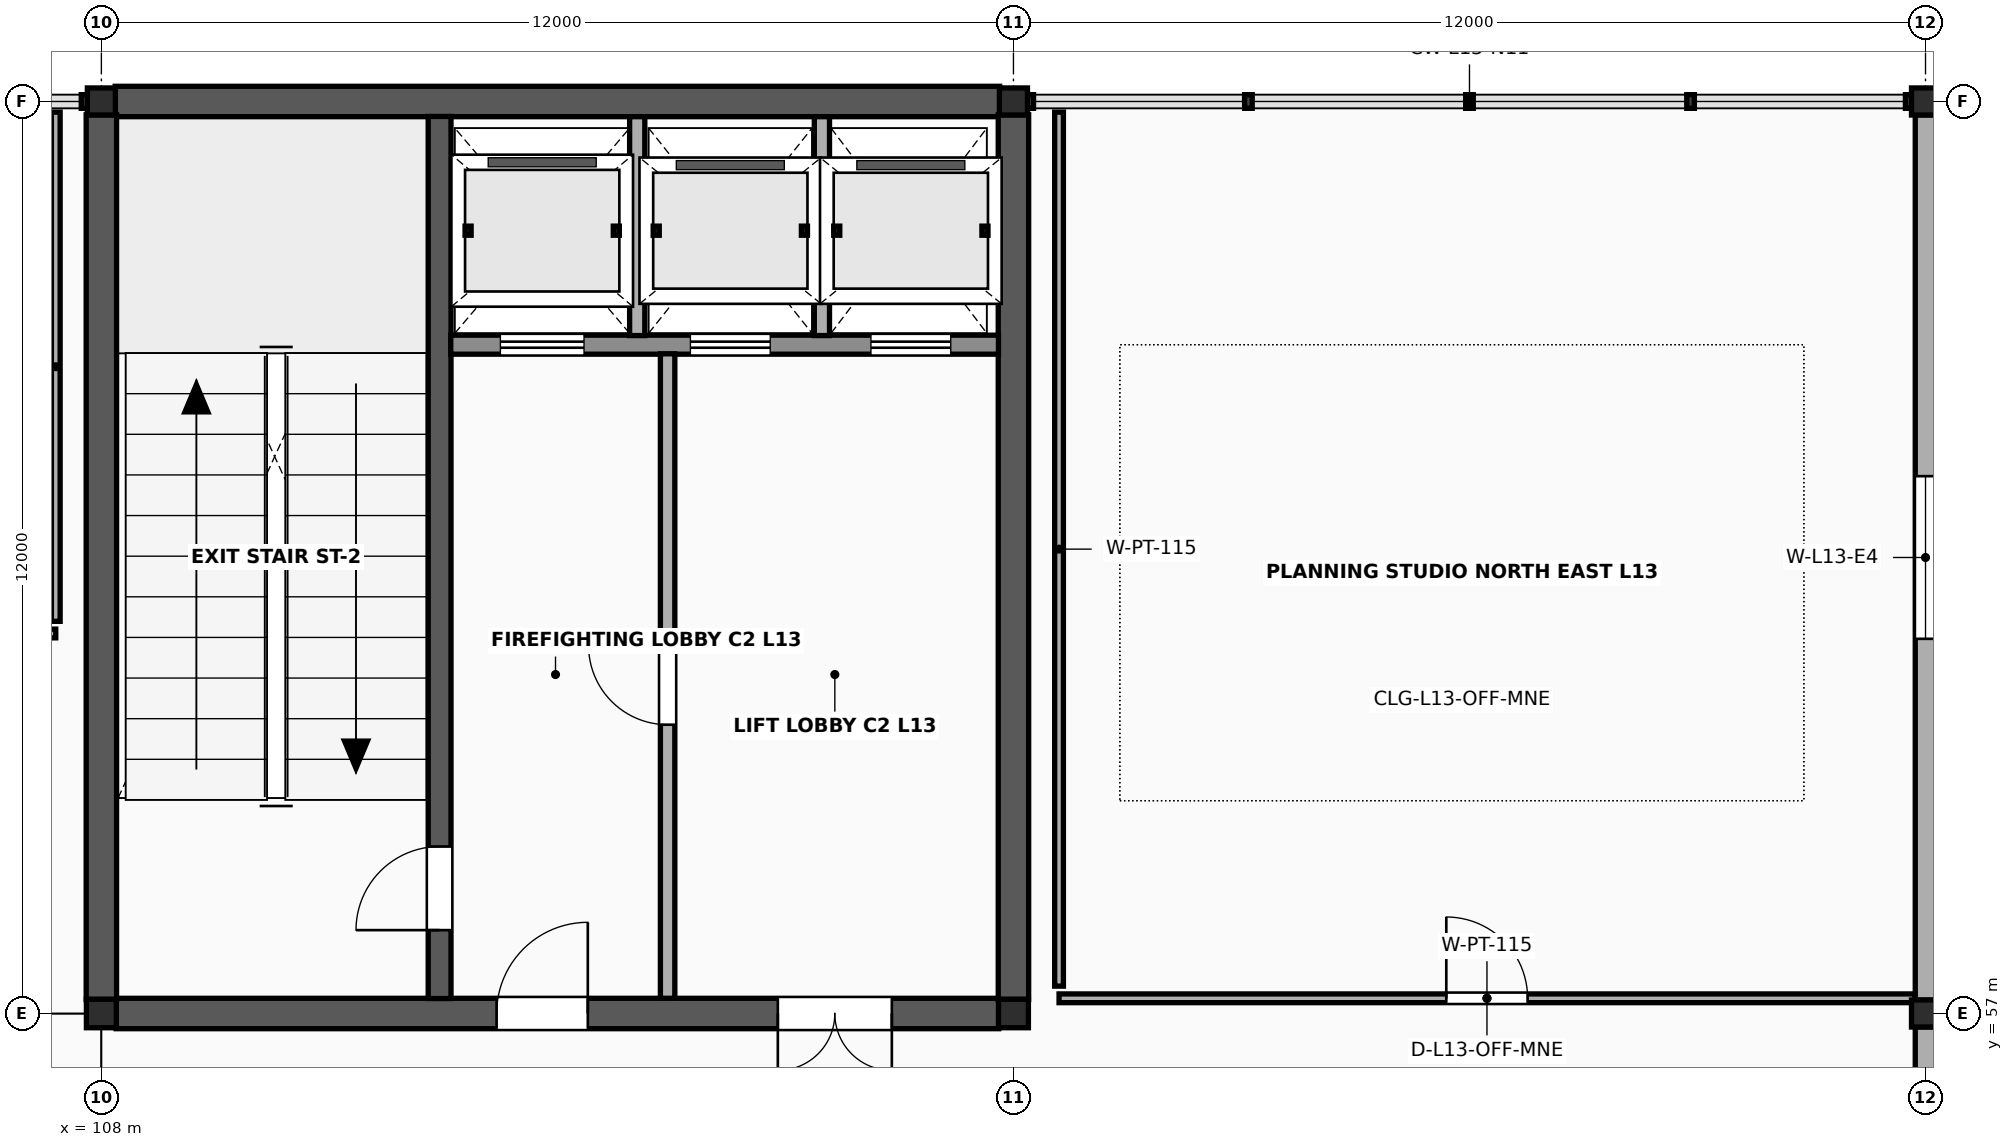
"""IFC4 building model, lengths in metres.
Left out: names, types, materials, properties, quantities, classifications, styles, units other than length and angle.
Written with IfcOpenShell. Run it as: python <this file> out.ifc"""

import sys

from ifc_helpers import new_model, si_unit, direction, frame, frame_2d, origin, origin_2d, place, context, subcontext, project, spatial, rectangle, i_section, extrude, element, fill, save


model = new_model("IFC4")
c1 = context("Model", 3, precision=1e-05, world=origin(), true_north=direction((0.0, 1.0)))
c2 = subcontext(c1, "Body", "Model", "MODEL_VIEW")
j1 = project(units=[si_unit("LENGTHUNIT", "METRE"), si_unit("PLANEANGLEUNIT", "RADIAN")], contexts=[c1])
p1 = place(None, origin())
s1 = spatial("IfcSite", under=j1, at=p1, CompositionType="ELEMENT")
p2 = place(p1, origin())
s2 = spatial("IfcBuilding", under=s1, at=p2, CompositionType="ELEMENT")
p3 = place(p2, frame((0.0, 0.0, 53.6)))
s3 = spatial("IfcBuildingStorey", under=s2, at=p3, CompositionType="ELEMENT", Elevation=53.6)
p4 = place(p3, frame((108.0, 57.0, 0.0), z_axis=(0.0, 0.0, 1.0), x_axis=(1.0, 0.0, 0.0)))
e1 = element("IfcColumn", 1, at=p4, inside=s3, PredefinedType="COLUMN", context=c2, shape_type="SweptSolid", body=[
    extrude(i_section(OverallWidth=0.394, OverallDepth=0.375, WebThickness=0.017, FlangeThickness=0.028, FilletRadius=0.018, at=origin_2d()), origin(), (0.0, 0.0, 1.0), 4.0),
])
p5 = place(p3, frame((108.0, 69.0, 0.0), z_axis=(0.0, 0.0, 1.0), x_axis=(1.0, 0.0, 0.0)))
e2 = element("IfcColumn", 2, at=p5, inside=s3, PredefinedType="COLUMN", context=c2, shape_type="SweptSolid", body=[
    extrude(i_section(OverallWidth=0.369, OverallDepth=0.356, WebThickness=0.011, FlangeThickness=0.018, FilletRadius=0.018, at=origin_2d()), origin(), (0.0, 0.0, 1.0), 4.0),
])
p6 = place(p3, frame((120.0, 57.0, 0.0), z_axis=(0.0, 0.0, 1.0), x_axis=(1.0, 0.0, 0.0)))
e3 = element("IfcColumn", 3, at=p6, inside=s3, PredefinedType="COLUMN", context=c2, shape_type="SweptSolid", body=[
    extrude(i_section(OverallWidth=0.394, OverallDepth=0.375, WebThickness=0.017, FlangeThickness=0.028, FilletRadius=0.018, at=origin_2d()), origin(), (0.0, 0.0, 1.0), 4.0),
])
for number, where, z_axis, x_axis in (
    (4, (120.0, 69.0, 0.0), (0.0, 0.0, 1.0), (1.0, 0.0, 0.0)),
    (5, (132.0, 57.0, 0.0), (0.0, 0.0, 1.0), (1.0, 0.0, 0.0)),
    (6, (132.0, 69.0, 0.0), (0.0, 0.0, 1.0), (1.0, 0.0, 0.0)),
):
    element("IfcColumn", number, at=place(p3, frame(where, z_axis=z_axis, x_axis=x_axis)), inside=s3, PredefinedType="COLUMN", context=c2, shape_type="SweptSolid", body=[
        extrude(i_section(OverallWidth=0.369, OverallDepth=0.356, WebThickness=0.011, FlangeThickness=0.018, FilletRadius=0.018, at=origin_2d()), origin(), (0.0, 0.0, 1.0), 4.0),
    ])
p7 = place(p3, frame((108.194, 57.0, 0.0), z_axis=(0.0, 0.0, 1.0), x_axis=(1.0, 0.0, 0.0)))
e7 = element("IfcWall", 7, at=p7, inside=s3, PredefinedType="SHEAR", context=c2, shape_type="SweptSolid", body=[
    extrude(rectangle(XDim=11.612, YDim=0.4, at=frame_2d((5.806, 0.0))), origin(), (0.0, 0.0, 1.0), 3.818),
])
p8 = place(p7, frame((5.006, 0.0, 0.0)))
e8 = element("IfcOpeningElement", 8, at=p8, cuts=e7, PredefinedType="OPENING", context=c2, shape_type="SweptSolid", body=[
    extrude(rectangle(XDim=1.2, YDim=2.2, at=frame_2d((0.6, 1.1))), frame((0.0, 0.215, 0.0), z_axis=(0.0, -1.0, 0.0), x_axis=(1.0, 0.0, 0.0)), (0.0, 0.0, 1.0), 0.43),
])
p9 = place(p7, frame((8.706, 0.0, 0.0)))
e9 = element("IfcOpeningElement", 9, at=p9, cuts=e7, PredefinedType="OPENING", context=c2, shape_type="SweptSolid", body=[
    extrude(rectangle(XDim=1.5, YDim=2.25, at=frame_2d((0.75, 1.125))), frame((0.0, 0.215, 0.0), z_axis=(0.0, -1.0, 0.0), x_axis=(1.0, 0.0, 0.0)), (0.0, 0.0, 1.0), 0.43),
])
p10 = place(p3, frame((108.181, 69.0, 0.0), z_axis=(0.0, 0.0, 1.0), x_axis=(1.0, 0.0, 0.0)))
e10 = element("IfcWall", 10, at=p10, inside=s3, PredefinedType="SHEAR", context=c2, shape_type="SweptSolid", body=[
    extrude(rectangle(XDim=11.637, YDim=0.4, at=frame_2d((5.819, 0.0))), origin(), (0.0, 0.0, 1.0), 3.818),
])
for number, where, z_axis, x_axis in (
    (11, (108.0, 57.185, 0.0), (0.0, 0.0, 1.0), (0.0, 1.0, 0.0)),
    (12, (120.0, 57.185, 0.0), (0.0, 0.0, 1.0), (0.0, 1.0, 0.0)),
):
    element("IfcWall", number, at=place(p3, frame(where, z_axis=z_axis, x_axis=x_axis)), inside=s3, PredefinedType="SHEAR", context=c2, shape_type="SweptSolid", body=[
        extrude(rectangle(XDim=11.64, YDim=0.4, at=frame_2d((5.82, 0.0))), origin(), (0.0, 0.0, 1.0), 3.818),
    ])
p11 = place(p3, frame((112.45, 57.197, 0.0), z_axis=(0.0, 0.0, 1.0), x_axis=(0.0, 1.0, 0.0)))
e13 = element("IfcWall", 13, at=p11, inside=s3, PredefinedType="SHEAR", context=c2, shape_type="SweptSolid", body=[
    extrude(rectangle(XDim=11.606, YDim=0.3, at=frame_2d((5.803, 0.0))), origin(), (0.0, 0.0, 1.0), 3.818),
])
p12 = place(p11, frame((0.9, 0.0, 0.0)))
e14 = element("IfcOpeningElement", 14, at=p12, cuts=e13, PredefinedType="OPENING", context=c2, shape_type="SweptSolid", body=[
    extrude(rectangle(XDim=1.1, YDim=2.2, at=frame_2d((0.55, 1.1))), frame((0.0, 0.165, 0.0), z_axis=(0.0, -1.0, 0.0), x_axis=(1.0, 0.0, 0.0)), (0.0, 0.0, 1.0), 0.33),
])
p13 = place(p3, frame((112.597, 65.8, 0.0), z_axis=(0.0, 0.0, 1.0), x_axis=(1.0, 0.0, 0.0)))
e15 = element("IfcWall", 15, at=p13, inside=s3, PredefinedType="SOLIDWALL", context=c2, shape_type="SweptSolid", body=[
    extrude(rectangle(XDim=7.206, YDim=0.25, at=frame_2d((3.603, 0.0))), origin(), (0.0, 0.0, 1.0), 3.818),
])
p14 = place(p13, frame((0.653, 0.0, 0.0)))
e16 = element("IfcOpeningElement", 16, at=p14, cuts=e15, PredefinedType="OPENING", context=c2, shape_type="SweptSolid", body=[
    extrude(rectangle(XDim=1.1, YDim=2.24, at=frame_2d((0.55, 1.12))), frame((0.0, 0.14, 0.0), z_axis=(0.0, -1.0, 0.0), x_axis=(1.0, 0.0, 0.0)), (0.0, 0.0, 1.0), 0.28),
])
p15 = place(p13, frame((3.153, 0.0, 0.0)))
e17 = element("IfcOpeningElement", 17, at=p15, cuts=e15, PredefinedType="OPENING", context=c2, shape_type="SweptSolid", body=[
    extrude(rectangle(XDim=1.05, YDim=2.2, at=frame_2d((0.525, 1.1))), frame((0.0, 0.14, 0.0), z_axis=(0.0, -1.0, 0.0), x_axis=(1.0, 0.0, 0.0)), (0.0, 0.0, 1.0), 0.28),
])
p16 = place(p13, frame((5.528, 0.0, 0.0)))
e18 = element("IfcOpeningElement", 18, at=p16, cuts=e15, PredefinedType="OPENING", context=c2, shape_type="SweptSolid", body=[
    extrude(rectangle(XDim=1.05, YDim=2.2, at=frame_2d((0.525, 1.1))), frame((0.0, 0.14, 0.0), z_axis=(0.0, -1.0, 0.0), x_axis=(1.0, 0.0, 0.0)), (0.0, 0.0, 1.0), 0.28),
])
for number, where, z_axis, x_axis in (
    (19, (115.05, 65.92, 0.0), (0.0, 0.0, 1.0), (0.0, 1.0, 0.0)),
    (20, (117.48, 65.92, 0.0), (0.0, 0.0, 1.0), (0.0, 1.0, 0.0)),
):
    element("IfcWall", number, at=place(p3, frame(where, z_axis=z_axis, x_axis=x_axis)), inside=s3, PredefinedType="SOLIDWALL", context=c2, shape_type="SweptSolid", body=[
        extrude(rectangle(XDim=2.88, YDim=0.2, at=frame_2d((1.44, 0.0))), origin(), (0.0, 0.0, 1.0), 3.808),
    ])
p17 = place(p3, frame((115.45, 57.2, 0.0), z_axis=(0.0, 0.0, 1.0), x_axis=(0.0, 1.0, 0.0)))
e21 = element("IfcWall", 21, at=p17, inside=s3, PredefinedType="SOLIDWALL", context=c2, shape_type="SweptSolid", body=[
    extrude(rectangle(XDim=8.48, YDim=0.19, at=frame_2d((4.24, 0.0))), origin(), (0.0, 0.0, 1.0), 3.808),
])
p18 = place(p17, frame((3.6, 0.0, 0.0)))
e22 = element("IfcOpeningElement", 22, at=p18, cuts=e21, PredefinedType="OPENING", context=c2, shape_type="SweptSolid", body=[
    extrude(rectangle(XDim=1.04, YDim=2.18, at=frame_2d((0.52, 1.09))), frame((0.0, 0.11, 0.0), z_axis=(0.0, -1.0, 0.0), x_axis=(1.0, 0.0, 0.0)), (0.0, 0.0, 1.0), 0.22),
])
p19 = place(p3, frame((132.0, 45.176, 0.0), z_axis=(0.0, 0.0, 1.0), x_axis=(0.0, 1.0, 0.0)))
e23 = element("IfcWall", 23, at=p19, inside=s3, PredefinedType="SOLIDWALL", context=c2, shape_type="SweptSolid", body=[
    extrude(rectangle(XDim=11.648, YDim=0.27, at=frame_2d((5.824, 0.0))), origin(), (0.0, 0.0, 1.0), 3.271),
])
p20 = place(p19, frame((4.834, 0.0, 0.78)))
e24 = element("IfcOpeningElement", 24, at=p20, cuts=e23, PredefinedType="OPENING", context=c2, shape_type="SweptSolid", body=[
    extrude(rectangle(XDim=1.98, YDim=1.58, at=frame_2d((0.99, 0.79))), frame((0.0, 0.15, 0.0), z_axis=(0.0, -1.0, 0.0), x_axis=(1.0, 0.0, 0.0)), (0.0, 0.0, 1.0), 0.3),
])
p21 = place(p3, frame((132.0, 57.176, 0.0), z_axis=(0.0, 0.0, 1.0), x_axis=(0.0, 1.0, 0.0)))
e25 = element("IfcWall", 25, at=p21, inside=s3, PredefinedType="SOLIDWALL", context=c2, shape_type="SweptSolid", body=[
    extrude(rectangle(XDim=11.648, YDim=0.27, at=frame_2d((5.824, 0.0))), origin(), (0.0, 0.0, 1.0), 3.271),
])
p22 = place(p21, frame((4.754, 0.0, 0.78)))
e26 = element("IfcOpeningElement", 26, at=p22, cuts=e25, PredefinedType="OPENING", context=c2, shape_type="SweptSolid", body=[
    extrude(rectangle(XDim=2.14, YDim=1.58, at=frame_2d((1.07, 0.79))), frame((0.0, 0.15, 0.0), z_axis=(0.0, -1.0, 0.0), x_axis=(1.0, 0.0, 0.0)), (0.0, 0.0, 1.0), 0.3),
])
p23 = place(p3, frame((73.0, 62.0, 0.0), z_axis=(0.0, 0.0, 1.0), x_axis=(1.0, 0.0, 0.0)))
e27 = element("IfcWall", 27, at=p23, inside=s3, PredefinedType="PARTITIONING", context=c2, shape_type="SweptSolid", body=[
    extrude(rectangle(XDim=34.4, YDim=0.115, at=frame_2d((17.2, 0.0))), origin(), (0.0, 0.0, 1.0), 2.88),
])
p24 = place(p23, frame((16.27, 0.0, 0.0)))
e28 = element("IfcOpeningElement", 28, at=p24, cuts=e27, PredefinedType="OPENING", context=c2, shape_type="SweptSolid", body=[
    extrude(rectangle(XDim=1.86, YDim=2.41, at=frame_2d((0.93, 1.205))), frame((0.0, 0.073, 0.0), z_axis=(0.0, -1.0, 0.0), x_axis=(1.0, 0.0, 0.0)), (0.0, 0.0, 1.0), 0.145),
])
p25 = place(p3, frame((107.4, 62.16, 0.0), z_axis=(0.0, 0.0, 1.0), x_axis=(0.0, 1.0, 0.0)))
e29 = element("IfcWall", 29, at=p25, inside=s3, PredefinedType="PARTITIONING", context=c2, shape_type="SweptSolid", body=[
    extrude(rectangle(XDim=6.7, YDim=0.115, at=frame_2d((3.35, 0.0))), origin(), (0.0, 0.0, 1.0), 2.88),
])
p26 = place(p3, frame((120.6, 57.2, 0.0), z_axis=(0.0, 0.0, 1.0), x_axis=(1.0, 0.0, 0.0)))
e30 = element("IfcWall", 30, at=p26, inside=s3, PredefinedType="PARTITIONING", context=c2, shape_type="SweptSolid", body=[
    extrude(rectangle(XDim=11.26, YDim=0.115, at=frame_2d((5.63, 0.0))), origin(), (0.0, 0.0, 1.0), 2.88),
])
p27 = place(p26, frame((5.095, 0.0, 0.0)))
e31 = element("IfcOpeningElement", 31, at=p27, cuts=e30, PredefinedType="OPENING", context=c2, shape_type="SweptSolid", body=[
    extrude(rectangle(XDim=1.07, YDim=2.19, at=frame_2d((0.535, 1.095))), frame((0.0, 0.073, 0.0), z_axis=(0.0, -1.0, 0.0), x_axis=(1.0, 0.0, 0.0)), (0.0, 0.0, 1.0), 0.145),
])
p28 = place(p3, frame((120.6, 57.36, 0.0), z_axis=(0.0, 0.0, 1.0), x_axis=(0.0, 1.0, 0.0)))
e32 = element("IfcWall", 32, at=p28, inside=s3, PredefinedType="PARTITIONING", context=c2, shape_type="SweptSolid", body=[
    extrude(rectangle(XDim=11.5, YDim=0.115, at=frame_2d((5.75, 0.0))), origin(), (0.0, 0.0, 1.0), 2.88),
])
p29 = place(p22, origin())
e33 = element("IfcWindow", 33, at=p29, inside=s3, PartitioningType="DOUBLE_PANEL_VERTICAL", PredefinedType="WINDOW", context=c2, shape_type="SweptSolid", body=[
    extrude(rectangle(XDim=2.14, YDim=1.58, at=frame_2d((1.07, 0.79))), frame((0.0, 0.03, 0.0), z_axis=(0.0, -1.0, 0.0), x_axis=(1.0, 0.0, 0.0)), (0.0, 0.0, 1.0), 0.06),
])
fill(e26, e33)
p30 = place(p12, origin())
e34 = element("IfcDoor", 34, at=p30, inside=s3, OperationType="SINGLE_SWING_LEFT", PredefinedType="DOOR", context=c2, shape_type="SweptSolid", body=[
    extrude(rectangle(XDim=1.1, YDim=2.2, at=frame_2d((0.55, 1.1))), frame((0.0, 0.025, 0.0), z_axis=(0.0, -1.0, 0.0), x_axis=(1.0, 0.0, 0.0)), (0.0, 0.0, 1.0), 0.05),
])
fill(e14, e34)
p31 = place(p18, origin())
e35 = element("IfcDoor", 35, at=p31, inside=s3, OperationType="SINGLE_SWING_RIGHT", PredefinedType="DOOR", context=c2, shape_type="SweptSolid", body=[
    extrude(rectangle(XDim=1.04, YDim=2.18, at=frame_2d((0.52, 1.09))), frame((0.0, 0.025, 0.0), z_axis=(0.0, -1.0, 0.0), x_axis=(1.0, 0.0, 0.0)), (0.0, 0.0, 1.0), 0.05),
])
fill(e22, e35)
p32 = place(p8, origin())
e36 = element("IfcDoor", 36, at=p32, inside=s3, OperationType="SINGLE_SWING_RIGHT", PredefinedType="DOOR", context=c2, shape_type="SweptSolid", body=[
    extrude(rectangle(XDim=1.2, YDim=2.2, at=frame_2d((0.6, 1.1))), frame((0.0, 0.025, 0.0), z_axis=(0.0, -1.0, 0.0), x_axis=(1.0, 0.0, 0.0)), (0.0, 0.0, 1.0), 0.05),
])
fill(e8, e36)
p33 = place(p9, origin())
e37 = element("IfcDoor", 37, at=p33, inside=s3, OperationType="DOUBLE_DOOR_SINGLE_SWING", PredefinedType="DOOR", context=c2, shape_type="SweptSolid", body=[
    extrude(rectangle(XDim=1.5, YDim=2.25, at=frame_2d((0.75, 1.125))), frame((0.0, 0.025, 0.0), z_axis=(0.0, -1.0, 0.0), x_axis=(1.0, 0.0, 0.0)), (0.0, 0.0, 1.0), 0.05),
])
fill(e9, e37)
p34 = place(p14, origin())
e38 = element("IfcDoor", 38, at=p34, inside=s3, OperationType="SLIDING_TO_LEFT", PredefinedType="USERDEFINED", context=c2, shape_type="SweptSolid", body=[
    extrude(rectangle(XDim=1.1, YDim=2.24, at=frame_2d((0.55, 1.12))), frame((0.0, 0.025, 0.0), z_axis=(0.0, -1.0, 0.0), x_axis=(1.0, 0.0, 0.0)), (0.0, 0.0, 1.0), 0.05),
])
fill(e16, e38)
p35 = place(p15, origin())
e39 = element("IfcDoor", 39, at=p35, inside=s3, OperationType="SLIDING_TO_LEFT", PredefinedType="USERDEFINED", context=c2, shape_type="SweptSolid", body=[
    extrude(rectangle(XDim=1.05, YDim=2.2, at=frame_2d((0.525, 1.1))), frame((0.0, 0.025, 0.0), z_axis=(0.0, -1.0, 0.0), x_axis=(1.0, 0.0, 0.0)), (0.0, 0.0, 1.0), 0.05),
])
fill(e17, e39)
p36 = place(p16, origin())
e40 = element("IfcDoor", 40, at=p36, inside=s3, OperationType="SLIDING_TO_LEFT", PredefinedType="USERDEFINED", context=c2, shape_type="SweptSolid", body=[
    extrude(rectangle(XDim=1.05, YDim=2.2, at=frame_2d((0.525, 1.1))), frame((0.0, 0.025, 0.0), z_axis=(0.0, -1.0, 0.0), x_axis=(1.0, 0.0, 0.0)), (0.0, 0.0, 1.0), 0.05),
])
fill(e18, e40)
p37 = place(p27, origin())
e41 = element("IfcDoor", 41, at=p37, inside=s3, OperationType="SINGLE_SWING_LEFT", PredefinedType="DOOR", context=c2, shape_type="SweptSolid", body=[
    extrude(rectangle(XDim=1.07, YDim=2.19, at=frame_2d((0.535, 1.095))), frame((0.0, 0.025, 0.0), z_axis=(0.0, -1.0, 0.0), x_axis=(1.0, 0.0, 0.0)), (0.0, 0.0, 1.0), 0.05),
])
fill(e31, e41)
save(model, sys.argv[1])
